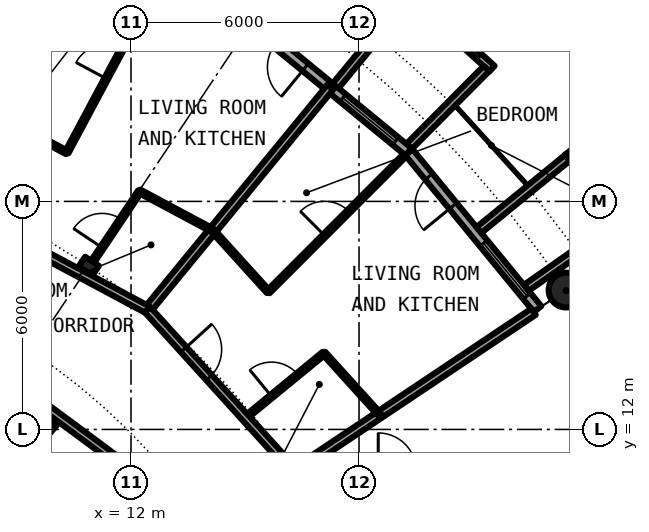
"""IFC4 building model, lengths in metres.
Left out: names, types, materials, properties, quantities, classifications, styles, units other than length and angle.
Written with IfcOpenShell. Run it as: python <this file> out.ifc"""

import sys

from ifc_helpers import new_model, si_unit, direction, frame, frame_2d, origin, origin_2d, place, context, subcontext, project, spatial, rectangle, circle, hollow_circle, i_section, extrude, element, fill, save


model = new_model("IFC4")
c1 = context("Model", 3, precision=1e-05, world=origin(), true_north=direction((0.0, 1.0)))
c2 = subcontext(c1, "Body", "Model", "MODEL_VIEW")
j1 = project(units=[si_unit("LENGTHUNIT", "METRE"), si_unit("PLANEANGLEUNIT", "RADIAN")], contexts=[c1])
p1 = place(None, origin())
s1 = spatial("IfcSite", under=j1, at=p1, CompositionType="ELEMENT")
p2 = place(p1, origin())
s2 = spatial("IfcBuilding", under=s1, at=p2, CompositionType="ELEMENT")
p3 = place(p2, frame((0.0, 0.0, 117.75)))
s3 = spatial("IfcBuildingStorey", under=s2, at=p3, CompositionType="ELEMENT", Elevation=117.75)
p4 = place(p3, frame((23.448, 15.667, 0.0), z_axis=(0.0, 0.0, 1.0), x_axis=(1.0, 0.0, 0.0)))
e1 = element("IfcColumn", 1, at=p4, inside=s3, PredefinedType="COLUMN", context=c2, shape_type="SweptSolid", body=[
    extrude(hollow_circle(Radius=0.457, WallThickness=0.04, at=origin_2d()), origin(), (0.0, 0.0, 1.0), 3.05),
])
p5 = place(p3, frame((10.889, 16.297, 0.0), z_axis=(0.0, 0.0, 1.0), x_axis=(0.55557023302, 0.831469612303, 0.0)))
e2 = element("IfcColumn", 2, at=p5, inside=s3, PredefinedType="COLUMN", context=c2, shape_type="SweptSolid", body=[
    extrude(i_section(OverallWidth=0.307, OverallDepth=0.432, WebThickness=0.021, FlangeThickness=0.04, FilletRadius=0.027, at=origin_2d()), origin(), (0.0, 0.0, 1.0), 3.05),
])
p6 = place(p3, frame((22.699, 15.167, 0.0), z_axis=(0.0, 0.0, 1.0), x_axis=(-0.634382322723, 0.773019449054, 0.0)))
e3 = element("IfcWall", 3, at=p6, inside=s3, PredefinedType="SOLIDWALL", context=c2, shape_type="SweptSolid", body=[
    extrude(rectangle(XDim=5.352, YDim=0.25, at=frame_2d((2.676, 0.0))), origin(), (0.0, 0.0, 1.0), 2.7),
])
p7 = place(p6, frame((0.441, 0.0, 0.3)))
e4 = element("IfcOpeningElement", 4, at=p7, cuts=e3, PredefinedType="OPENING", context=c2, shape_type="SweptSolid", body=[
    extrude(rectangle(XDim=1.8, YDim=2.1, at=frame_2d((0.9, 1.05))), frame((0.0, 0.135, 0.0), z_axis=(0.0, -1.0, 0.0), x_axis=(1.0, 0.0, 0.0)), (0.0, 0.0, 1.0), 0.27),
])
p8 = place(p6, frame((3.51, 0.0, 0.0)))
e5 = element("IfcOpeningElement", 5, at=p8, cuts=e3, PredefinedType="OPENING", context=c2, shape_type="SweptSolid", body=[
    extrude(rectangle(XDim=1.0, YDim=2.2, at=frame_2d((0.5, 1.1))), frame((0.0, 0.135, 0.0), z_axis=(0.0, -1.0, 0.0), x_axis=(1.0, 0.0, 0.0)), (0.0, 0.0, 1.0), 0.27),
])
p9 = place(p3, frame((24.94, 17.382, -0.03), z_axis=(0.0, 0.0, 1.0), x_axis=(-0.603375996329, 0.797456837111, 0.0)))
e6 = element("IfcWall", 6, at=p9, inside=s3, PredefinedType="SOLIDWALL", context=c2, shape_type="SweptSolid", body=[
    extrude(rectangle(XDim=2.391, YDim=0.2, at=frame_2d((1.196, 0.0))), origin(), (0.0, 0.0, 1.0), 2.73),
])
p10 = place(p9, frame((0.156, 0.0, 0.33)))
e7 = element("IfcOpeningElement", 7, at=p10, cuts=e6, PredefinedType="OPENING", context=c2, shape_type="SweptSolid", body=[
    extrude(circle(Radius=1.04, at=frame_2d((1.04, 1.04))), frame((0.0, 0.11, 0.0), z_axis=(0.0, -1.0, 0.0), x_axis=(1.0, 0.0, 0.0)), (0.0, 0.0, 1.0), 0.22),
])
p11 = place(p3, frame((22.402, 15.726, -0.03), z_axis=(0.0, 0.0, 1.0), x_axis=(0.818275399393, 0.574826383135, 0.0)))
e8 = element("IfcWall", 8, at=p11, inside=s3, PredefinedType="SOLIDWALL", context=c2, shape_type="SweptSolid", body=[
    extrude(rectangle(XDim=2.929, YDim=0.2, at=frame_2d((1.465, 0.0))), origin(), (0.0, 0.0, 1.0), 2.73),
])
p12 = place(p3, frame((21.155, 17.246, -0.03), z_axis=(0.0, 0.0, 1.0), x_axis=(0.775179004516, 0.631741648902, 0.0)))
e9 = element("IfcWall", 9, at=p12, inside=s3, PredefinedType="SOLIDWALL", context=c2, shape_type="SweptSolid", body=[
    extrude(rectangle(XDim=3.006, YDim=0.2, at=frame_2d((1.503, 0.0))), origin(), (0.0, 0.0, 1.0), 2.73),
])
p13 = place(p3, frame((19.304, 19.304, 0.0), z_axis=(0.0, 0.0, 1.0), x_axis=(-0.773019449054, 0.634382322723, 0.0)))
e10 = element("IfcWall", 10, at=p13, inside=s3, PredefinedType="SOLIDWALL", context=c2, shape_type="SweptSolid", body=[
    extrude(rectangle(XDim=5.352, YDim=0.25, at=frame_2d((2.676, 0.0))), origin(), (0.0, 0.0, 1.0), 2.7),
])
p14 = place(p13, frame((0.441, 0.0, 0.3)))
e11 = element("IfcOpeningElement", 11, at=p14, cuts=e10, PredefinedType="OPENING", context=c2, shape_type="SweptSolid", body=[
    extrude(rectangle(XDim=1.8, YDim=2.1, at=frame_2d((0.9, 1.05))), frame((0.0, 0.135, 0.0), z_axis=(0.0, -1.0, 0.0), x_axis=(1.0, 0.0, 0.0)), (0.0, 0.0, 1.0), 0.27),
])
p15 = place(p13, frame((3.51, 0.0, 0.0)))
e12 = element("IfcOpeningElement", 12, at=p15, cuts=e10, PredefinedType="OPENING", context=c2, shape_type="SweptSolid", body=[
    extrude(rectangle(XDim=1.0, YDim=2.2, at=frame_2d((0.5, 1.1))), frame((0.0, 0.135, 0.0), z_axis=(0.0, -1.0, 0.0), x_axis=(1.0, 0.0, 0.0)), (0.0, 0.0, 1.0), 0.27),
])
p16 = place(p3, frame((21.5, 21.493, -0.03), z_axis=(0.0, 0.0, 1.0), x_axis=(-0.740998365753, 0.671506829416, 0.0)))
e13 = element("IfcWall", 13, at=p16, inside=s3, PredefinedType="SOLIDWALL", context=c2, shape_type="SweptSolid", body=[
    extrude(rectangle(XDim=2.993, YDim=0.2, at=frame_2d((1.497, 0.0))), origin(), (0.0, 0.0, 1.0), 2.73),
])
p17 = place(p16, frame((0.457, 0.0, 0.33)))
e14 = element("IfcOpeningElement", 14, at=p17, cuts=e13, PredefinedType="OPENING", context=c2, shape_type="SweptSolid", body=[
    extrude(circle(Radius=1.04, at=frame_2d((1.04, 1.04))), frame((0.0, 0.11, 0.0), z_axis=(0.0, -1.0, 0.0), x_axis=(1.0, 0.0, 0.0)), (0.0, 0.0, 1.0), 0.22),
])
p18 = place(p3, frame((19.323, 19.45, -0.03), z_axis=(0.0, 0.0, 1.0), x_axis=(0.704476739375, 0.709727076896, 0.0)))
e15 = element("IfcWall", 15, at=p18, inside=s3, PredefinedType="SOLIDWALL", context=c2, shape_type="SweptSolid", body=[
    extrude(rectangle(XDim=2.883, YDim=0.2, at=frame_2d((1.441, 0.0))), origin(), (0.0, 0.0, 1.0), 2.73),
])
p19 = place(p3, frame((17.384, 21.041, -0.03), z_axis=(0.0, 0.0, 1.0), x_axis=(0.63709551667, 0.770784861449, 0.0)))
e16 = element("IfcWall", 16, at=p19, inside=s3, PredefinedType="SOLIDWALL", context=c2, shape_type="SweptSolid", body=[
    extrude(rectangle(XDim=3.006, YDim=0.2, at=frame_2d((1.503, 0.0))), origin(), (0.0, 0.0, 1.0), 2.73),
])
p20 = place(p3, frame((4.909, 5.958, 0.0), z_axis=(0.0, 0.0, 1.0), x_axis=(0.635976043025, 0.771708800454, 0.0)))
e17 = element("IfcWall", 17, at=p20, inside=s3, PredefinedType="PARTITIONING", context=c2, shape_type="SweptSolid", body=[
    extrude(rectangle(XDim=8.213, YDim=0.1, at=frame_2d((4.106, 0.0))), origin(), (0.0, 0.0, 1.0), 2.7),
])
p21 = place(p20, frame((6.49, 0.0, 0.0)))
e18 = element("IfcOpeningElement", 18, at=p21, cuts=e17, PredefinedType="OPENING", context=c2, shape_type="SweptSolid", body=[
    extrude(rectangle(XDim=0.9, YDim=2.3, at=frame_2d((0.45, 1.15))), frame((0.0, 0.06, 0.0), z_axis=(0.0, -1.0, 0.0), x_axis=(1.0, 0.0, 0.0)), (0.0, 0.0, 1.0), 0.12),
])
p22 = place(p20, frame((2.384, 0.0, 0.0)))
e19 = element("IfcOpeningElement", 19, at=p22, cuts=e17, PredefinedType="OPENING", context=c2, shape_type="SweptSolid", body=[
    extrude(rectangle(XDim=0.9, YDim=2.3, at=frame_2d((0.45, 1.15))), frame((0.0, 0.06, 0.0), z_axis=(0.0, -1.0, 0.0), x_axis=(1.0, 0.0, 0.0)), (0.0, 0.0, 1.0), 0.12),
])
p23 = place(p3, frame((8.392, 20.314, 0.0), z_axis=(0.0, 0.0, 1.0), x_axis=(0.381673756215, 0.924297107978, 0.0)))
e20 = element("IfcWall", 20, at=p23, inside=s3, PredefinedType="PARTITIONING", context=c2, shape_type="SweptSolid", body=[
    extrude(rectangle(XDim=5.195, YDim=0.1, at=frame_2d((2.598, 0.0))), origin(), (0.0, 0.0, 1.0), 2.7),
])
p24 = place(p3, frame((10.31, 19.289, 0.0), z_axis=(0.0, 0.0, 1.0), x_axis=(0.47140999111, 0.881914179658, 0.0)))
e21 = element("IfcWall", 21, at=p24, inside=s3, PredefinedType="PARTITIONING", context=c2, shape_type="SweptSolid", body=[
    extrude(rectangle(XDim=5.303, YDim=0.1, at=frame_2d((2.652, 0.0))), origin(), (0.0, 0.0, 1.0), 2.7),
])
p25 = place(p24, frame((2.202, 0.0, 0.0)))
e22 = element("IfcOpeningElement", 22, at=p25, cuts=e21, PredefinedType="OPENING", context=c2, shape_type="SweptSolid", body=[
    extrude(rectangle(XDim=0.9, YDim=2.3, at=frame_2d((0.45, 1.15))), frame((0.0, 0.06, 0.0), z_axis=(0.0, -1.0, 0.0), x_axis=(1.0, 0.0, 0.0)), (0.0, 0.0, 1.0), 0.12),
])
p26 = place(p3, frame((11.025, 16.466, 0.0), z_axis=(0.0, 0.0, 1.0), x_axis=(0.556469477731, 0.830868052313, 0.0)))
e23 = element("IfcWall", 23, at=p26, inside=s3, PredefinedType="PARTITIONING", context=c2, shape_type="SweptSolid", body=[
    extrude(rectangle(XDim=2.164, YDim=0.1, at=frame_2d((1.082, 0.0))), origin(), (0.0, 0.0, 1.0), 2.7),
])
p27 = place(p26, frame((0.383, 0.0, 0.0)))
e24 = element("IfcOpeningElement", 24, at=p27, cuts=e23, PredefinedType="OPENING", context=c2, shape_type="SweptSolid", body=[
    extrude(rectangle(XDim=0.9, YDim=2.3, at=frame_2d((0.45, 1.15))), frame((0.0, 0.06, 0.0), z_axis=(0.0, -1.0, 0.0), x_axis=(1.0, 0.0, 0.0)), (0.0, 0.0, 1.0), 0.12),
])
p28 = place(p3, frame((12.436, 15.149, 0.0), z_axis=(0.0, 0.0, 1.0), x_axis=(0.63447412651, 0.772944100689, 0.0)))
e25 = element("IfcWall", 25, at=p28, inside=s3, PredefinedType="PARTITIONING", context=c2, shape_type="SweptSolid", body=[
    extrude(rectangle(XDim=7.576, YDim=0.2, at=frame_2d((3.788, 0.0))), origin(), (0.0, 0.0, 1.0), 2.7),
])
p29 = place(p3, frame((15.01, 12.309, 0.0), z_axis=(0.0, 0.0, 1.0), x_axis=(0.773240932873, 0.634112339992, 0.0)))
e26 = element("IfcWall", 26, at=p29, inside=s3, PredefinedType="PARTITIONING", context=c2, shape_type="SweptSolid", body=[
    extrude(rectangle(XDim=2.674, YDim=0.1, at=frame_2d((1.337, 0.0))), origin(), (0.0, 0.0, 1.0), 2.7),
])
p30 = place(p29, frame((0.887, 0.0, 0.0)))
e27 = element("IfcOpeningElement", 27, at=p30, cuts=e26, PredefinedType="OPENING", context=c2, shape_type="SweptSolid", body=[
    extrude(rectangle(XDim=0.9, YDim=2.3, at=frame_2d((0.45, 1.15))), frame((0.0, 0.06, 0.0), z_axis=(0.0, -1.0, 0.0), x_axis=(1.0, 0.0, 0.0)), (0.0, 0.0, 1.0), 0.12),
])
p31 = place(p3, frame((15.613, 15.621, 0.0), z_axis=(0.0, 0.0, 1.0), x_axis=(0.706914880313, 0.707298629994, 0.0)))
e28 = element("IfcWall", 28, at=p31, inside=s3, PredefinedType="PARTITIONING", context=c2, shape_type="SweptSolid", body=[
    extrude(rectangle(XDim=5.09, YDim=0.1, at=frame_2d((2.545, 0.0))), origin(), (0.0, 0.0, 1.0), 2.7),
])
p32 = place(p31, frame((2.095, 0.0, 0.0)))
e29 = element("IfcOpeningElement", 29, at=p32, cuts=e28, PredefinedType="OPENING", context=c2, shape_type="SweptSolid", body=[
    extrude(rectangle(XDim=0.9, YDim=2.3, at=frame_2d((0.45, 1.15))), frame((0.0, 0.06, 0.0), z_axis=(0.0, -1.0, 0.0), x_axis=(1.0, 0.0, 0.0)), (0.0, 0.0, 1.0), 0.12),
])
p33 = place(p3, frame((16.477, 11.009, 0.0), z_axis=(0.0, 0.0, 1.0), x_axis=(0.831406593008, 0.555664536482, 0.0)))
e30 = element("IfcWall", 30, at=p33, inside=s3, PredefinedType="PARTITIONING", context=c2, shape_type="SweptSolid", body=[
    extrude(rectangle(XDim=7.358, YDim=0.2, at=frame_2d((3.679, 0.0))), origin(), (0.0, 0.0, 1.0), 2.7),
])
p34 = place(p3, frame((4.906, 16.172, 0.0), z_axis=(0.0, 0.0, 1.0), x_axis=(0.803204584823, -0.59570327758, 0.0)))
e31 = element("IfcWall", 31, at=p34, inside=s3, PredefinedType="PARTITIONING", context=c2, shape_type="SweptSolid", body=[
    extrude(rectangle(XDim=11.387, YDim=0.2, at=frame_2d((5.693, 0.0))), origin(), (0.0, 0.0, 1.0), 2.7),
])
p35 = place(p34, frame((4.38, 0.0, 0.0)))
e32 = element("IfcOpeningElement", 32, at=p35, cuts=e31, PredefinedType="OPENING", context=c2, shape_type="SweptSolid", body=[
    extrude(rectangle(XDim=1.0, YDim=2.3, at=frame_2d((0.5, 1.15))), frame((0.0, 0.11, 0.0), z_axis=(0.0, -1.0, 0.0), x_axis=(1.0, 0.0, 0.0)), (0.0, 0.0, 1.0), 0.22),
])
p36 = place(p3, frame((5.687, 18.757, 0.0), z_axis=(0.0, 0.0, 1.0), x_axis=(0.8819312112, -0.471378127104, 0.0)))
e33 = element("IfcWall", 33, at=p36, inside=s3, PredefinedType="PARTITIONING", context=c2, shape_type="SweptSolid", body=[
    extrude(rectangle(XDim=7.65, YDim=0.2, at=frame_2d((3.825, 0.0))), origin(), (0.0, 0.0, 1.0), 2.39),
])
p37 = place(p36, frame((2.371, 0.0, 0.0)))
e34 = element("IfcOpeningElement", 34, at=p37, cuts=e33, PredefinedType="OPENING", context=c2, shape_type="SweptSolid", body=[
    extrude(rectangle(XDim=1.0, YDim=2.3, at=frame_2d((0.5, 1.15))), frame((0.0, 0.11, 0.0), z_axis=(0.0, -1.0, 0.0), x_axis=(1.0, 0.0, 0.0)), (0.0, 0.0, 1.0), 0.22),
])
p38 = place(p3, frame((12.434, 15.151, 0.0), z_axis=(0.0, 0.0, 1.0), x_axis=(0.671481997275, -0.741020868354, 0.0)))
e35 = element("IfcWall", 35, at=p38, inside=s3, PredefinedType="PARTITIONING", context=c2, shape_type="SweptSolid", body=[
    extrude(rectangle(XDim=5.596, YDim=0.2, at=frame_2d((2.798, 0.0))), origin(), (0.0, 0.0, 1.0), 2.39),
])
p39 = place(p38, frame((1.417, 0.0, 0.0)))
e36 = element("IfcOpeningElement", 36, at=p39, cuts=e35, PredefinedType="OPENING", context=c2, shape_type="SweptSolid", body=[
    extrude(rectangle(XDim=1.0, YDim=2.3, at=frame_2d((0.5, 1.15))), frame((0.0, 0.11, 0.0), z_axis=(0.0, -1.0, 0.0), x_axis=(1.0, 0.0, 0.0)), (0.0, 0.0, 1.0), 0.22),
])
p40 = place(p3, frame((6.471, 21.341, 0.0), z_axis=(0.0, 0.0, 1.0), x_axis=(0.881932070463, -0.471376519451, 0.0)))
e37 = element("IfcWall", 37, at=p40, inside=s3, PredefinedType="PARTITIONING", context=c2, shape_type="SweptSolid", body=[
    extrude(rectangle(XDim=4.355, YDim=0.1, at=frame_2d((2.178, 0.0))), origin(), (0.0, 0.0, 1.0), 2.7),
])
p41 = place(p40, frame((0.639, 0.0, 0.0)))
e38 = element("IfcOpeningElement", 38, at=p41, cuts=e37, PredefinedType="OPENING", context=c2, shape_type="SweptSolid", body=[
    extrude(rectangle(XDim=0.9, YDim=2.3, at=frame_2d((0.45, 1.15))), frame((0.0, 0.06, 0.0), z_axis=(0.0, -1.0, 0.0), x_axis=(1.0, 0.0, 0.0)), (0.0, 0.0, 1.0), 0.12),
])
p42 = place(p3, frame((12.223, 18.267, 0.0), z_axis=(0.0, 0.0, 1.0), x_axis=(0.881765102974, -0.47168877788, 0.0)))
e39 = element("IfcWall", 39, at=p42, inside=s3, PredefinedType="PARTITIONING", context=c2, shape_type="SweptSolid", body=[
    extrude(rectangle(XDim=2.176, YDim=0.1, at=frame_2d((1.088, 0.0))), origin(), (0.0, 0.0, 1.0), 2.7),
])
p43 = place(p3, frame((14.147, 17.238, 0.0), z_axis=(0.0, 0.0, 1.0), x_axis=(0.671674967707, -0.740845960882, 0.0)))
e40 = element("IfcWall", 40, at=p43, inside=s3, PredefinedType="PARTITIONING", context=c2, shape_type="SweptSolid", body=[
    extrude(rectangle(XDim=2.181, YDim=0.1, at=frame_2d((1.091, 0.0))), origin(), (0.0, 0.0, 1.0), 2.7),
])
p44 = place(p3, frame((17.072, 14.011, 0.0), z_axis=(0.0, 0.0, 1.0), x_axis=(0.67169789574, -0.740825172937, 0.0)))
e41 = element("IfcWall", 41, at=p44, inside=s3, PredefinedType="PARTITIONING", context=c2, shape_type="SweptSolid", body=[
    extrude(rectangle(XDim=2.183, YDim=0.1, at=frame_2d((1.091, 0.0))), origin(), (0.0, 0.0, 1.0), 2.7),
])
p45 = place(p7, origin())
e42 = element("IfcWindow", 42, at=p45, inside=s3, PartitioningType="SINGLE_PANEL", PredefinedType="WINDOW", context=c2, shape_type="SweptSolid", body=[
    extrude(rectangle(XDim=1.8, YDim=2.1, at=frame_2d((0.9, 1.05))), frame((0.0, 0.03, 0.0), z_axis=(0.0, -1.0, 0.0), x_axis=(1.0, 0.0, 0.0)), (0.0, 0.0, 1.0), 0.06),
])
fill(e4, e42)
p46 = place(p8, origin())
e43 = element("IfcDoor", 43, at=p46, inside=s3, OperationType="SINGLE_SWING_LEFT", PredefinedType="DOOR", context=c2, shape_type="SweptSolid", body=[
    extrude(rectangle(XDim=1.0, YDim=2.2, at=frame_2d((0.5, 1.1))), frame((0.0, 0.025, 0.0), z_axis=(0.0, -1.0, 0.0), x_axis=(1.0, 0.0, 0.0)), (0.0, 0.0, 1.0), 0.05),
])
fill(e5, e43)
p47 = place(p14, origin())
e44 = element("IfcWindow", 44, at=p47, inside=s3, PartitioningType="SINGLE_PANEL", PredefinedType="WINDOW", context=c2, shape_type="SweptSolid", body=[
    extrude(rectangle(XDim=1.8, YDim=2.1, at=frame_2d((0.9, 1.05))), frame((0.0, 0.03, 0.0), z_axis=(0.0, -1.0, 0.0), x_axis=(1.0, 0.0, 0.0)), (0.0, 0.0, 1.0), 0.06),
])
fill(e11, e44)
p48 = place(p17, origin())
e45 = element("IfcWindow", 45, at=p48, inside=s3, PartitioningType="SINGLE_PANEL", PredefinedType="WINDOW", context=c2, shape_type="SweptSolid", body=[
    extrude(circle(Radius=1.04, at=frame_2d((1.04, 1.04))), frame((0.0, 0.03, 0.0), z_axis=(0.0, -1.0, 0.0), x_axis=(1.0, 0.0, 0.0)), (0.0, 0.0, 1.0), 0.06),
])
fill(e14, e45)
p49 = place(p15, origin())
e46 = element("IfcDoor", 46, at=p49, inside=s3, OperationType="SINGLE_SWING_LEFT", PredefinedType="DOOR", context=c2, shape_type="SweptSolid", body=[
    extrude(rectangle(XDim=1.0, YDim=2.2, at=frame_2d((0.5, 1.1))), frame((0.0, 0.025, 0.0), z_axis=(0.0, -1.0, 0.0), x_axis=(1.0, 0.0, 0.0)), (0.0, 0.0, 1.0), 0.05),
])
fill(e12, e46)
p50 = place(p39, origin())
e47 = element("IfcDoor", 47, at=p50, inside=s3, OperationType="SINGLE_SWING_LEFT", PredefinedType="DOOR", context=c2, shape_type="SweptSolid", body=[
    extrude(rectangle(XDim=1.0, YDim=2.3, at=frame_2d((0.5, 1.15))), frame((0.0, 0.025, 0.0), z_axis=(0.0, -1.0, 0.0), x_axis=(1.0, 0.0, 0.0)), (0.0, 0.0, 1.0), 0.05),
])
fill(e36, e47)
p51 = place(p30, origin())
e48 = element("IfcDoor", 48, at=p51, inside=s3, OperationType="SINGLE_SWING_LEFT", PredefinedType="DOOR", context=c2, shape_type="SweptSolid", body=[
    extrude(rectangle(XDim=0.9, YDim=2.3, at=frame_2d((0.45, 1.15))), frame((0.0, 0.025, 0.0), z_axis=(0.0, -1.0, 0.0), x_axis=(1.0, 0.0, 0.0)), (0.0, 0.0, 1.0), 0.05),
])
fill(e27, e48)
p52 = place(p32, origin())
e49 = element("IfcDoor", 49, at=p52, inside=s3, OperationType="SINGLE_SWING_RIGHT", PredefinedType="DOOR", context=c2, shape_type="SweptSolid", body=[
    extrude(rectangle(XDim=0.9, YDim=2.3, at=frame_2d((0.45, 1.15))), frame((0.0, 0.025, 0.0), z_axis=(0.0, -1.0, 0.0), x_axis=(1.0, 0.0, 0.0)), (0.0, 0.0, 1.0), 0.05),
])
fill(e29, e49)
p53 = place(p27, origin())
e50 = element("IfcDoor", 50, at=p53, inside=s3, OperationType="SINGLE_SWING_LEFT", PredefinedType="DOOR", context=c2, shape_type="SweptSolid", body=[
    extrude(rectangle(XDim=0.9, YDim=2.3, at=frame_2d((0.45, 1.15))), frame((0.0, 0.025, 0.0), z_axis=(0.0, -1.0, 0.0), x_axis=(1.0, 0.0, 0.0)), (0.0, 0.0, 1.0), 0.05),
])
fill(e24, e50)
p54 = place(p25, origin())
e51 = element("IfcDoor", 51, at=p54, inside=s3, OperationType="SINGLE_SWING_RIGHT", PredefinedType="DOOR", context=c2, shape_type="SweptSolid", body=[
    extrude(rectangle(XDim=0.9, YDim=2.3, at=frame_2d((0.45, 1.15))), frame((0.0, 0.025, 0.0), z_axis=(0.0, -1.0, 0.0), x_axis=(1.0, 0.0, 0.0)), (0.0, 0.0, 1.0), 0.05),
])
fill(e22, e51)
save(model, sys.argv[1])
